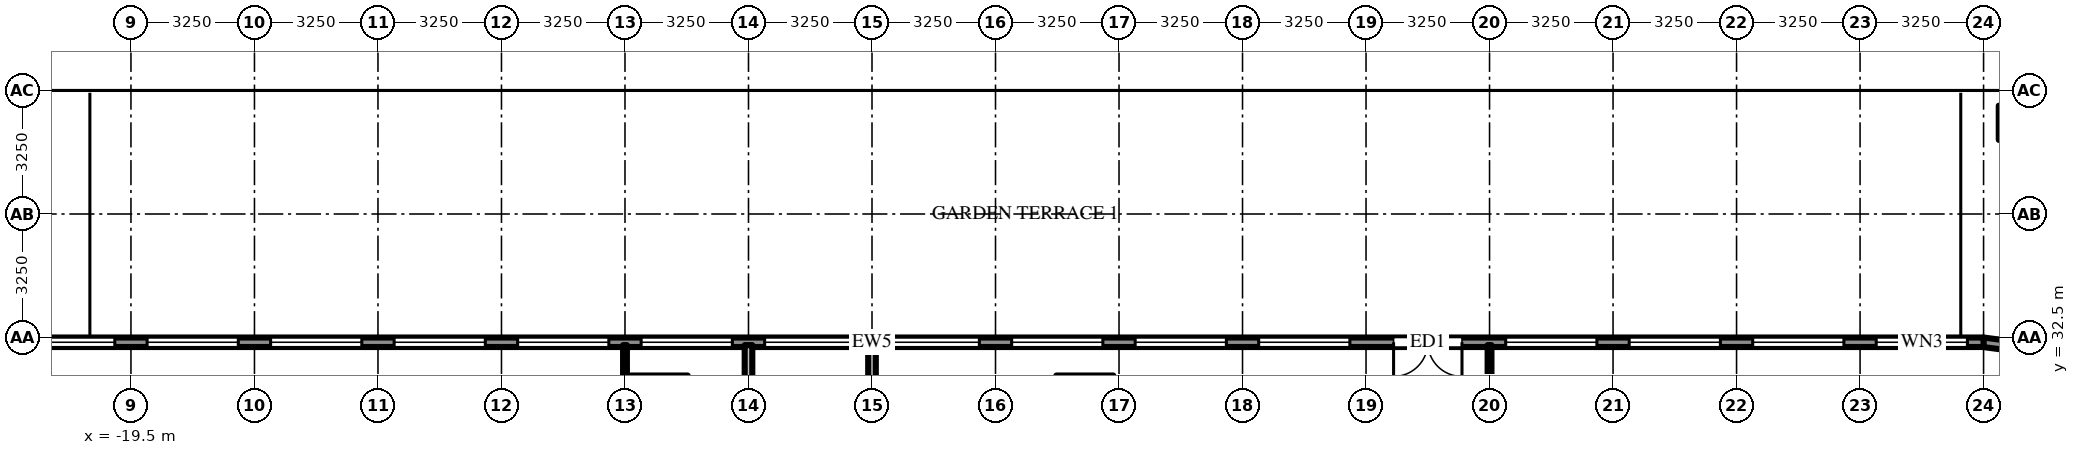
"""IFC4 building model, lengths in metres.
Left out: names, types, materials, properties, quantities, classifications, styles, units other than length and angle.
Written with IfcOpenShell. Run it as: python <this file> out.ifc"""

import sys

from ifc_helpers import new_model, si_unit, direction, frame, frame_2d, origin, place, context, subcontext, project, spatial, polyline, rectangle, outline, extrude, source, transform, mapped, element, fill, save


model = new_model("IFC4")
c1 = context("Model", 3, precision=1e-05, world=origin(), true_north=direction((0.0, 1.0)))
c2 = subcontext(c1, "Body", "Model", "MODEL_VIEW")
j1 = project(units=[si_unit("LENGTHUNIT", "METRE"), si_unit("PLANEANGLEUNIT", "RADIAN")], contexts=[c1])
p1 = place(None, origin())
s1 = spatial("IfcSite", under=j1, at=p1, CompositionType="ELEMENT")
p2 = place(p1, origin())
s2 = spatial("IfcBuilding", under=s1, at=p2, CompositionType="ELEMENT")
p3 = place(p2, frame((0.0, 0.0, 24.0)))
s3 = spatial("IfcBuildingStorey", under=s2, at=p3, CompositionType="ELEMENT", Elevation=24.0)
p4 = place(p3, origin())
e1 = element("IfcWall", 1, at=p4, inside=s3, PredefinedType="SOLIDWALL", context=c2, shape_type="SweptSolid", body=[
    extrude(outline(polyline([(32.5, 29.25), (32.389, 30.091), (32.065, 30.875), (31.548, 31.548), (30.875, 32.065), (30.091, 32.389), (29.25, 32.5), (29.234, 32.25), (30.026, 32.146), (30.749, 31.846), (31.37, 31.37), (31.846, 30.749), (32.146, 30.026), (32.25, 29.234), (32.5, 29.25)])), origin(), (0.0, 0.0, 1.0), 4.7),
])
m1 = source(origin(), c2, "Body", "SweptSolid", [
    extrude(rectangle(XDim=58.5, YDim=0.25, at=frame_2d((29.25, 0.0))), origin(), (0.0, 0.0, 1.0), 4.7),
])
p5 = place(p3, frame((29.25, 32.375, 0.0), z_axis=(0.0, 0.0, 1.0), x_axis=(-1.0, 0.0, 0.0)))
e2 = element("IfcWall", 2, at=p5, inside=s3, PredefinedType="SOLIDWALL", context=c2, shape_type="MappedRepresentation", body=[
    mapped(m1, transform((0.0, 0.0, 0.0))),
])
m2 = source(origin(), c2, "Body", "SweptSolid", [
    extrude(rectangle(XDim=2.4, YDim=3.3, at=frame_2d((1.2, 1.65))), frame((0.0, 0.135, 0.0), z_axis=(0.0, -1.0, 0.0), x_axis=(1.0, 0.0, 0.0)), (0.0, 0.0, 1.0), 0.27),
])
p6 = place(p5, frame((0.425, 0.0, 0.6)))
e3 = element("IfcOpeningElement", 3, at=p6, cuts=e2, PredefinedType="OPENING", context=c2, shape_type="MappedRepresentation", body=[
    mapped(m2, transform((0.0, 0.0, 0.0))),
])
p7 = place(p5, frame((3.675, 0.0, 0.6)))
e4 = element("IfcOpeningElement", 4, at=p7, cuts=e2, PredefinedType="OPENING", context=c2, shape_type="MappedRepresentation", body=[
    mapped(m2, transform((0.0, 0.0, 0.0))),
])
p8 = place(p5, frame((6.925, 0.0, 0.6)))
e5 = element("IfcOpeningElement", 5, at=p8, cuts=e2, PredefinedType="OPENING", context=c2, shape_type="MappedRepresentation", body=[
    mapped(m2, transform((0.0, 0.0, 0.0))),
])
p9 = place(p5, frame((10.175, 0.0, 0.6)))
e6 = element("IfcOpeningElement", 6, at=p9, cuts=e2, PredefinedType="OPENING", context=c2, shape_type="MappedRepresentation", body=[
    mapped(m2, transform((0.0, 0.0, 0.0))),
])
m3 = source(origin(), c2, "Body", "SweptSolid", [
    extrude(rectangle(XDim=1.8, YDim=2.4, at=frame_2d((0.9, 1.2))), frame((0.0, 0.135, 0.0), z_axis=(0.0, -1.0, 0.0), x_axis=(1.0, 0.0, 0.0)), (0.0, 0.0, 1.0), 0.27),
])
p10 = place(p5, frame((13.725, 0.0, 0.0)))
e7 = element("IfcOpeningElement", 7, at=p10, cuts=e2, PredefinedType="OPENING", context=c2, shape_type="MappedRepresentation", body=[
    mapped(m3, transform((0.0, 0.0, 0.0))),
])
p11 = place(p5, frame((16.675, 0.0, 0.6)))
e8 = element("IfcOpeningElement", 8, at=p11, cuts=e2, PredefinedType="OPENING", context=c2, shape_type="MappedRepresentation", body=[
    mapped(m2, transform((0.0, 0.0, 0.0))),
])
p12 = place(p5, frame((19.925, 0.0, 0.6)))
e9 = element("IfcOpeningElement", 9, at=p12, cuts=e2, PredefinedType="OPENING", context=c2, shape_type="MappedRepresentation", body=[
    mapped(m2, transform((0.0, 0.0, 0.0))),
])
p13 = place(p5, frame((23.175, 0.0, 0.6)))
e10 = element("IfcOpeningElement", 10, at=p13, cuts=e2, PredefinedType="OPENING", context=c2, shape_type="MappedRepresentation", body=[
    mapped(m2, transform((0.0, 0.0, 0.0))),
])
p14 = place(p5, frame((26.425, 0.0, 0.6)))
e11 = element("IfcOpeningElement", 11, at=p14, cuts=e2, PredefinedType="OPENING", context=c2, shape_type="MappedRepresentation", body=[
    mapped(m2, transform((0.0, 0.0, 0.0))),
])
p15 = place(p5, frame((29.675, 0.0, 0.6)))
e12 = element("IfcOpeningElement", 12, at=p15, cuts=e2, PredefinedType="OPENING", context=c2, shape_type="MappedRepresentation", body=[
    mapped(m2, transform((0.0, 0.0, 0.0))),
])
p16 = place(p5, frame((32.925, 0.0, 0.6)))
e13 = element("IfcOpeningElement", 13, at=p16, cuts=e2, PredefinedType="OPENING", context=c2, shape_type="MappedRepresentation", body=[
    mapped(m2, transform((0.0, 0.0, 0.0))),
])
p17 = place(p5, frame((36.175, 0.0, 0.6)))
e14 = element("IfcOpeningElement", 14, at=p17, cuts=e2, PredefinedType="OPENING", context=c2, shape_type="MappedRepresentation", body=[
    mapped(m2, transform((0.0, 0.0, 0.0))),
])
p18 = place(p5, frame((39.425, 0.0, 0.6)))
e15 = element("IfcOpeningElement", 15, at=p18, cuts=e2, PredefinedType="OPENING", context=c2, shape_type="MappedRepresentation", body=[
    mapped(m2, transform((0.0, 0.0, 0.0))),
])
p19 = place(p5, frame((42.675, 0.0, 0.6)))
e16 = element("IfcOpeningElement", 16, at=p19, cuts=e2, PredefinedType="OPENING", context=c2, shape_type="MappedRepresentation", body=[
    mapped(m2, transform((0.0, 0.0, 0.0))),
])
p20 = place(p5, frame((45.925, 0.0, 0.6)))
e17 = element("IfcOpeningElement", 17, at=p20, cuts=e2, PredefinedType="OPENING", context=c2, shape_type="MappedRepresentation", body=[
    mapped(m2, transform((0.0, 0.0, 0.0))),
])
p21 = place(p5, frame((49.175, 0.0, 0.6)))
e18 = element("IfcOpeningElement", 18, at=p21, cuts=e2, PredefinedType="OPENING", context=c2, shape_type="MappedRepresentation", body=[
    mapped(m2, transform((0.0, 0.0, 0.0))),
])
p22 = place(p5, frame((52.425, 0.0, 0.6)))
e19 = element("IfcOpeningElement", 19, at=p22, cuts=e2, PredefinedType="OPENING", context=c2, shape_type="MappedRepresentation", body=[
    mapped(m2, transform((0.0, 0.0, 0.0))),
])
p23 = place(p5, frame((55.675, 0.0, 0.6)))
e20 = element("IfcOpeningElement", 20, at=p23, cuts=e2, PredefinedType="OPENING", context=c2, shape_type="MappedRepresentation", body=[
    mapped(m2, transform((0.0, 0.0, 0.0))),
])
p24 = place(p3, frame((-6.5, 26.062, 0.0), z_axis=(0.0, 0.0, 1.0), x_axis=(0.0, 1.0, 0.0)))
e21 = element("IfcWall", 21, at=p24, inside=s3, PredefinedType="PARTITIONING", context=c2, shape_type="SweptSolid", body=[
    extrude(rectangle(XDim=6.238, YDim=0.1, at=frame_2d((3.119, 0.0))), origin(), (0.0, 0.0, 1.0), 3.762),
])
m4 = source(origin(), c2, "Body", "SweptSolid", [
    extrude(rectangle(XDim=6.238, YDim=0.2, at=frame_2d((3.119, 0.0))), origin(), (0.0, 0.0, 1.0), 3.918),
])
p25 = place(p3, frame((-3.25, 26.062, 0.0), z_axis=(0.0, 0.0, 1.0), x_axis=(0.0, 1.0, 0.0)))
e22 = element("IfcWall", 22, at=p25, inside=s3, PredefinedType="PARTITIONING", context=c2, shape_type="MappedRepresentation", body=[
    mapped(m4, transform((0.0, 0.0, 0.0))),
])
m5 = source(origin(), c2, "Body", "SweptSolid", [
    extrude(rectangle(XDim=1.0, YDim=2.1, at=frame_2d((0.5, 1.05))), frame((0.0, 0.11, 0.0), z_axis=(0.0, -1.0, 0.0), x_axis=(1.0, 0.0, 0.0)), (0.0, 0.0, 1.0), 0.22),
])
p26 = place(p25, frame((0.288, 0.0, 0.0)))
e23 = element("IfcOpeningElement", 23, at=p26, cuts=e22, PredefinedType="OPENING", context=c2, shape_type="MappedRepresentation", body=[
    mapped(m5, transform((0.0, 0.0, 0.0))),
])
p27 = place(p3, frame((0.0, 32.3, 0.0), z_axis=(0.0, 0.0, 1.0), x_axis=(0.0, -1.0, 0.0)))
e24 = element("IfcWall", 24, at=p27, inside=s3, PredefinedType="PARTITIONING", context=c2, shape_type="MappedRepresentation", body=[
    mapped(m4, transform((0.0, 0.0, 0.0))),
])
m6 = source(origin(), c2, "Body", "SweptSolid", [
    extrude(rectangle(XDim=2.2, YDim=0.1, at=frame_2d((1.1, 0.0))), origin(), (0.0, 0.0, 1.0), 3.762),
])
p28 = place(p3, frame((16.25, 30.1, 0.0), z_axis=(0.0, 0.0, 1.0), x_axis=(0.0, 1.0, 0.0)))
e25 = element("IfcWall", 25, at=p28, inside=s3, PredefinedType="PARTITIONING", context=c2, shape_type="MappedRepresentation", body=[
    mapped(m6, transform((0.0, 0.0, 0.0))),
])
m7 = source(origin(), c2, "Body", "SweptSolid", [
    extrude(rectangle(XDim=2.4, YDim=3.3, at=frame_2d((1.2, 1.65))), frame((0.0, 0.03, 0.0), z_axis=(0.0, -1.0, 0.0), x_axis=(1.0, 0.0, 0.0)), (0.0, 0.0, 1.0), 0.06),
])
p29 = place(p6, origin())
e26 = element("IfcWindow", 26, at=p29, inside=s3, PartitioningType="SINGLE_PANEL", PredefinedType="WINDOW", context=c2, shape_type="MappedRepresentation", body=[
    mapped(m7, transform((0.0, 0.0, 0.0))),
])
fill(e3, e26)
p30 = place(p7, origin())
e27 = element("IfcWindow", 27, at=p30, inside=s3, PartitioningType="SINGLE_PANEL", PredefinedType="WINDOW", context=c2, shape_type="MappedRepresentation", body=[
    mapped(m7, transform((0.0, 0.0, 0.0))),
])
fill(e4, e27)
p31 = place(p8, origin())
e28 = element("IfcWindow", 28, at=p31, inside=s3, PartitioningType="SINGLE_PANEL", PredefinedType="WINDOW", context=c2, shape_type="MappedRepresentation", body=[
    mapped(m7, transform((0.0, 0.0, 0.0))),
])
fill(e5, e28)
p32 = place(p9, origin())
e29 = element("IfcWindow", 29, at=p32, inside=s3, PartitioningType="SINGLE_PANEL", PredefinedType="WINDOW", context=c2, shape_type="MappedRepresentation", body=[
    mapped(m7, transform((0.0, 0.0, 0.0))),
])
fill(e6, e29)
m8 = source(origin(), c2, "Body", "SweptSolid", [
    extrude(rectangle(XDim=1.8, YDim=2.4, at=frame_2d((0.9, 1.2))), frame((0.0, 0.025, 0.0), z_axis=(0.0, -1.0, 0.0), x_axis=(1.0, 0.0, 0.0)), (0.0, 0.0, 1.0), 0.05),
])
p33 = place(p10, origin())
e30 = element("IfcDoor", 30, at=p33, inside=s3, OperationType="DOUBLE_DOOR_SINGLE_SWING", PredefinedType="DOOR", context=c2, shape_type="MappedRepresentation", body=[
    mapped(m8, transform((0.0, 0.0, 0.0))),
])
fill(e7, e30)
p34 = place(p11, origin())
e31 = element("IfcWindow", 31, at=p34, inside=s3, PartitioningType="SINGLE_PANEL", PredefinedType="WINDOW", context=c2, shape_type="MappedRepresentation", body=[
    mapped(m7, transform((0.0, 0.0, 0.0))),
])
fill(e8, e31)
p35 = place(p12, origin())
e32 = element("IfcWindow", 32, at=p35, inside=s3, PartitioningType="SINGLE_PANEL", PredefinedType="WINDOW", context=c2, shape_type="MappedRepresentation", body=[
    mapped(m7, transform((0.0, 0.0, 0.0))),
])
fill(e9, e32)
p36 = place(p13, origin())
e33 = element("IfcWindow", 33, at=p36, inside=s3, PartitioningType="SINGLE_PANEL", PredefinedType="WINDOW", context=c2, shape_type="MappedRepresentation", body=[
    mapped(m7, transform((0.0, 0.0, 0.0))),
])
fill(e10, e33)
p37 = place(p14, origin())
e34 = element("IfcWindow", 34, at=p37, inside=s3, PartitioningType="SINGLE_PANEL", PredefinedType="WINDOW", context=c2, shape_type="MappedRepresentation", body=[
    mapped(m7, transform((0.0, 0.0, 0.0))),
])
fill(e11, e34)
p38 = place(p15, origin())
e35 = element("IfcWindow", 35, at=p38, inside=s3, PartitioningType="SINGLE_PANEL", PredefinedType="WINDOW", context=c2, shape_type="MappedRepresentation", body=[
    mapped(m7, transform((0.0, 0.0, 0.0))),
])
fill(e12, e35)
p39 = place(p16, origin())
e36 = element("IfcWindow", 36, at=p39, inside=s3, PartitioningType="SINGLE_PANEL", PredefinedType="WINDOW", context=c2, shape_type="MappedRepresentation", body=[
    mapped(m7, transform((0.0, 0.0, 0.0))),
])
fill(e13, e36)
p40 = place(p17, origin())
e37 = element("IfcWindow", 37, at=p40, inside=s3, PartitioningType="SINGLE_PANEL", PredefinedType="WINDOW", context=c2, shape_type="MappedRepresentation", body=[
    mapped(m7, transform((0.0, 0.0, 0.0))),
])
fill(e14, e37)
p41 = place(p18, origin())
e38 = element("IfcWindow", 38, at=p41, inside=s3, PartitioningType="SINGLE_PANEL", PredefinedType="WINDOW", context=c2, shape_type="MappedRepresentation", body=[
    mapped(m7, transform((0.0, 0.0, 0.0))),
])
fill(e15, e38)
p42 = place(p19, origin())
e39 = element("IfcWindow", 39, at=p42, inside=s3, PartitioningType="SINGLE_PANEL", PredefinedType="WINDOW", context=c2, shape_type="MappedRepresentation", body=[
    mapped(m7, transform((0.0, 0.0, 0.0))),
])
fill(e16, e39)
p43 = place(p20, origin())
e40 = element("IfcWindow", 40, at=p43, inside=s3, PartitioningType="SINGLE_PANEL", PredefinedType="WINDOW", context=c2, shape_type="MappedRepresentation", body=[
    mapped(m7, transform((0.0, 0.0, 0.0))),
])
fill(e17, e40)
p44 = place(p21, origin())
e41 = element("IfcWindow", 41, at=p44, inside=s3, PartitioningType="SINGLE_PANEL", PredefinedType="WINDOW", context=c2, shape_type="MappedRepresentation", body=[
    mapped(m7, transform((0.0, 0.0, 0.0))),
])
fill(e18, e41)
save(model, sys.argv[1])
